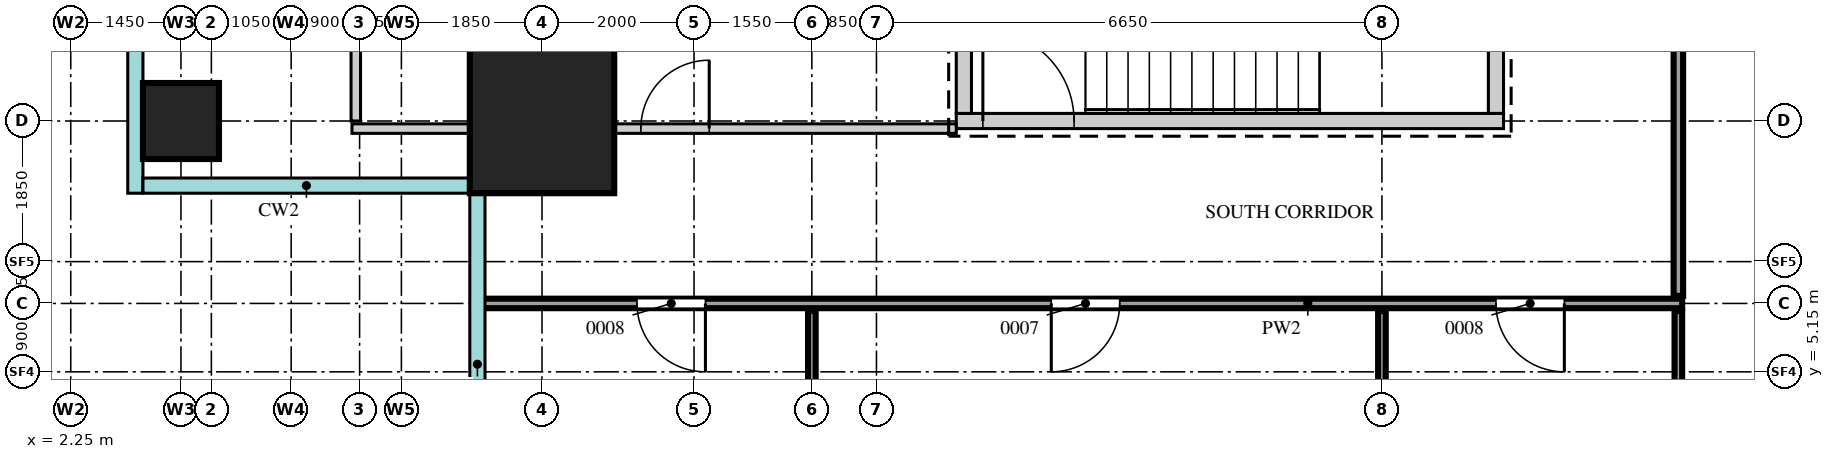
"""IFC4 building model, lengths in metres.
Left out: names, types, materials, properties, quantities, classifications, styles, units other than length and angle.
Written with IfcOpenShell. Run it as: python <this file> out.ifc"""

import sys

from ifc_helpers import new_model, si_unit, direction, frame, frame_2d, origin, origin_2d, place, context, subcontext, project, spatial, rectangle, extrude, source, transform, mapped, element, fill, save


model = new_model("IFC4")
c1 = context("Model", 3, precision=1e-05, world=origin(), true_north=direction((0.0, 1.0)))
c2 = subcontext(c1, "Body", "Model", "MODEL_VIEW")
j1 = project(units=[si_unit("LENGTHUNIT", "METRE"), si_unit("PLANEANGLEUNIT", "RADIAN")], contexts=[c1])
p1 = place(None, origin())
s1 = spatial("IfcSite", under=j1, at=p1, CompositionType="ELEMENT")
p2 = place(p1, origin())
s2 = spatial("IfcBuilding", under=s1, at=p2, CompositionType="ELEMENT")
p3 = place(p2, frame((0.0, 0.0, 172.7)))
s3 = spatial("IfcBuildingStorey", under=s2, at=p3, CompositionType="ELEMENT", Elevation=172.7)
m1 = source(origin(), c2, "Body", "SweptSolid", [
    extrude(rectangle(XDim=7.2, YDim=0.2, at=frame_2d((3.6, 0.0))), origin(), (0.0, 0.0, 1.0), 3.75),
])
p4 = place(p3, frame((13.9, 8.45, 0.0), z_axis=(0.0, 0.0, 1.0), x_axis=(1.0, 0.0, 0.0)))
e1 = element("IfcWall", 1, at=p4, inside=s3, PredefinedType="SHEAR", context=c2, shape_type="MappedRepresentation", body=[
    mapped(m1, transform((0.0, 0.0, 0.0))),
])
m2 = source(origin(), c2, "Body", "SweptSolid", [
    extrude(rectangle(XDim=1.2, YDim=2.1, at=frame_2d((0.6, 1.05))), frame((0.0, 0.11, 0.0), z_axis=(0.0, -1.0, 0.0), x_axis=(1.0, 0.0, 0.0)), (0.0, 0.0, 1.0), 0.22),
])
p5 = place(p4, frame((0.35, 0.0, 0.0)))
e2 = element("IfcOpeningElement", 2, at=p5, cuts=e1, PredefinedType="OPENING", context=c2, shape_type="MappedRepresentation", body=[
    mapped(m2, transform((0.0, 0.0, 0.0))),
])
m3 = source(origin(), c2, "Body", "SweptSolid", [
    extrude(rectangle(XDim=3.35, YDim=0.2, at=frame_2d((1.675, 0.0))), origin(), (0.0, 0.0, 1.0), 3.75),
])
for number, where, z_axis, x_axis in (
    (3, (21.0, 8.55, 0.0), (0.0, 0.0, 1.0), (0.0, 1.0, 0.0)),
    (4, (14.0, 8.55, 0.0), (0.0, 0.0, 1.0), (0.0, 1.0, 0.0)),
):
    element("IfcWall", number, at=place(p3, frame(where, z_axis=z_axis, x_axis=x_axis)), inside=s3, PredefinedType="SHEAR", context=c2, shape_type="MappedRepresentation", body=[
        mapped(m3, transform((0.0, 0.0, 0.0))),
    ])
m4 = source(origin(), c2, "Body", "SweptSolid", [
    extrude(rectangle(XDim=1.9, YDim=1.9, at=origin_2d()), origin(), (0.0, 0.0, 1.0), 4.0),
])
p6 = place(p3, frame((8.45, 8.45, 0.0), z_axis=(0.0, 0.0, 1.0), x_axis=(1.0, 0.0, 0.0)))
e5 = element("IfcColumn", 5, at=p6, inside=s3, PredefinedType="COLUMN", context=c2, shape_type="MappedRepresentation", body=[
    mapped(m4, transform((0.0, 0.0, 0.0))),
])
m5 = source(origin(), c2, "Body", "SweptSolid", [
    extrude(rectangle(XDim=1.0, YDim=1.0, at=origin_2d()), origin(), (0.0, 0.0, 1.0), 3.75),
])
p7 = place(p3, frame((3.7, 8.45, 0.0), z_axis=(0.0, 0.0, 1.0), x_axis=(1.0, 0.0, 0.0)))
e6 = element("IfcColumn", 6, at=p7, inside=s3, PredefinedType="COLUMN", context=c2, shape_type="MappedRepresentation", body=[
    mapped(m5, transform((0.0, 0.0, 0.0))),
])
m6 = source(origin(), c2, "Body", "SweptSolid", [
    extrude(rectangle(XDim=2.8, YDim=0.1, at=frame_2d((1.4, 0.0))), origin(), (0.0, 0.0, 1.0), 3.25),
])
p8 = place(p3, frame((12.0, 3.15, 0.0), z_axis=(0.0, 0.0, 1.0), x_axis=(0.0, 1.0, 0.0)))
e7 = element("IfcWall", 7, at=p8, inside=s3, PredefinedType="PARTITIONING", context=c2, shape_type="MappedRepresentation", body=[
    mapped(m6, transform((0.0, 0.0, 0.0))),
])
m7 = source(origin(), c2, "Body", "SweptSolid", [
    extrude(rectangle(XDim=2.8, YDim=0.1, at=frame_2d((1.4, 0.0))), origin(), (0.0, 0.0, 1.0), 3.42),
])
p9 = place(p3, frame((19.5, 3.15, 0.0), z_axis=(0.0, 0.0, 1.0), x_axis=(0.0, 1.0, 0.0)))
e8 = element("IfcWall", 8, at=p9, inside=s3, PredefinedType="PARTITIONING", context=c2, shape_type="MappedRepresentation", body=[
    mapped(m7, transform((0.0, 0.0, 0.0))),
])
m8 = source(origin(), c2, "Body", "SweptSolid", [
    extrude(rectangle(XDim=2.8, YDim=0.1, at=frame_2d((1.4, 0.0))), origin(), (0.0, 0.0, 1.0), 3.8),
])
p10 = place(p3, frame((23.4, 3.15, 0.0), z_axis=(0.0, 0.0, 1.0), x_axis=(0.0, 1.0, 0.0)))
e9 = element("IfcWall", 9, at=p10, inside=s3, PredefinedType="PARTITIONING", context=c2, shape_type="MappedRepresentation", body=[
    mapped(m8, transform((0.0, 0.0, 0.0))),
])
m9 = source(origin(), c2, "Body", "SweptSolid", [
    extrude(rectangle(XDim=15.8, YDim=0.125, at=frame_2d((7.9, 0.0))), origin(), (0.0, 0.0, 1.0), 3.8),
])
p11 = place(p3, frame((7.65, 6.05, 0.0), z_axis=(0.0, 0.0, 1.0), x_axis=(1.0, 0.0, 0.0)))
e10 = element("IfcWall", 10, at=p11, inside=s3, PredefinedType="PARTITIONING", context=c2, shape_type="MappedRepresentation", body=[
    mapped(m9, transform((0.0, 0.0, 0.0))),
])
m10 = source(origin(), c2, "Body", "SweptSolid", [
    extrude(rectangle(XDim=0.9, YDim=2.1, at=frame_2d((0.45, 1.05))), frame((0.0, 0.073, 0.0), z_axis=(0.0, -1.0, 0.0), x_axis=(1.0, 0.0, 0.0)), (0.0, 0.0, 1.0), 0.145),
])
p12 = place(p11, frame((2.05, 0.0, 0.0)))
e11 = element("IfcOpeningElement", 11, at=p12, cuts=e10, PredefinedType="OPENING", context=c2, shape_type="MappedRepresentation", body=[
    mapped(m10, transform((0.0, 0.0, 0.0))),
])
p13 = place(p11, frame((7.5, 0.0, 0.0)))
e12 = element("IfcOpeningElement", 12, at=p13, cuts=e10, PredefinedType="OPENING", context=c2, shape_type="MappedRepresentation", body=[
    mapped(m10, transform((0.0, 0.0, 0.0))),
])
p14 = place(p11, frame((13.35, 0.0, 0.0)))
e13 = element("IfcOpeningElement", 13, at=p14, cuts=e10, PredefinedType="OPENING", context=c2, shape_type="MappedRepresentation", body=[
    mapped(m10, transform((0.0, 0.0, 0.0))),
])
m11 = source(origin(), c2, "Body", "SweptSolid", [
    extrude(rectangle(XDim=14.75, YDim=0.125, at=frame_2d((7.375, 0.0))), origin(), (0.0, 0.0, 1.0), 3.8),
])
p15 = place(p3, frame((23.4, 6.15, 0.0), z_axis=(0.0, 0.0, 1.0), x_axis=(0.0, 1.0, 0.0)))
e14 = element("IfcWall", 14, at=p15, inside=s3, PredefinedType="PARTITIONING", context=c2, shape_type="MappedRepresentation", body=[
    mapped(m11, transform((0.0, 0.0, 0.0))),
])
p16 = place(p15, frame((7.95, 0.0, 0.0)))
e15 = element("IfcOpeningElement", 15, at=p16, cuts=e14, PredefinedType="OPENING", context=c2, shape_type="MappedRepresentation", body=[
    mapped(m10, transform((0.0, 0.0, 0.0))),
])
m12 = source(origin(), c2, "Body", "SweptSolid", [
    extrude(rectangle(XDim=7.95, YDim=0.125, at=frame_2d((3.975, 0.0))), origin(), (0.0, 0.0, 1.0), 3.25),
])
p17 = place(p3, frame((5.95, 8.35, 0.0), z_axis=(0.0, 0.0, 1.0), x_axis=(1.0, 0.0, 0.0)))
e16 = element("IfcWall", 16, at=p17, inside=s3, PredefinedType="PARTITIONING", context=c2, shape_type="MappedRepresentation", body=[
    mapped(m12, transform((0.0, 0.0, 0.0))),
])
p18 = place(p17, frame((3.8, 0.0, 0.0)))
e17 = element("IfcOpeningElement", 17, at=p18, cuts=e16, PredefinedType="OPENING", context=c2, shape_type="MappedRepresentation", body=[
    mapped(m10, transform((0.0, 0.0, 0.0))),
])
m13 = source(origin(), c2, "Body", "SweptSolid", [
    extrude(rectangle(XDim=4.05, YDim=0.125, at=frame_2d((2.025, 0.0))), origin(), (0.0, 0.0, 1.0), 3.8),
])
p19 = place(p3, frame((6.0, 8.45, 0.0), z_axis=(0.0, 0.0, 1.0), x_axis=(0.0, 1.0, 0.0)))
e18 = element("IfcWall", 18, at=p19, inside=s3, PredefinedType="PARTITIONING", context=c2, shape_type="MappedRepresentation", body=[
    mapped(m13, transform((0.0, 0.0, 0.0))),
])
m14 = source(origin(), c2, "Body", "SweptSolid", [
    extrude(rectangle(XDim=0.9, YDim=2.1, at=frame_2d((0.45, 1.05))), frame((0.0, 0.025, 0.0), z_axis=(0.0, -1.0, 0.0), x_axis=(1.0, 0.0, 0.0)), (0.0, 0.0, 1.0), 0.05),
])
p20 = place(p18, origin())
e19 = element("IfcDoor", 19, at=p20, inside=s3, OperationType="SINGLE_SWING_LEFT", PredefinedType="DOOR", context=c2, shape_type="MappedRepresentation", body=[
    mapped(m14, transform((0.0, 0.0, 0.0))),
])
fill(e17, e19)
p21 = place(p12, origin())
e20 = element("IfcDoor", 20, at=p21, inside=s3, OperationType="SINGLE_SWING_RIGHT", PredefinedType="DOOR", context=c2, shape_type="MappedRepresentation", body=[
    mapped(m14, transform((0.0, 0.0, 0.0))),
])
fill(e11, e20)
p22 = place(p13, origin())
e21 = element("IfcDoor", 21, at=p22, inside=s3, OperationType="SINGLE_SWING_LEFT", PredefinedType="DOOR", context=c2, shape_type="MappedRepresentation", body=[
    mapped(m14, transform((0.0, 0.0, 0.0))),
])
fill(e12, e21)
p23 = place(p14, origin())
e22 = element("IfcDoor", 22, at=p23, inside=s3, OperationType="SINGLE_SWING_RIGHT", PredefinedType="DOOR", context=c2, shape_type="MappedRepresentation", body=[
    mapped(m14, transform((0.0, 0.0, 0.0))),
])
fill(e13, e22)
m15 = source(origin(), c2, "Body", "SweptSolid", [
    extrude(rectangle(XDim=1.2, YDim=2.1, at=frame_2d((0.6, 1.05))), frame((0.0, 0.025, 0.0), z_axis=(0.0, -1.0, 0.0), x_axis=(1.0, 0.0, 0.0)), (0.0, 0.0, 1.0), 0.05),
])
p24 = place(p5, origin())
e23 = element("IfcDoor", 23, at=p24, inside=s3, OperationType="SINGLE_SWING_RIGHT", PredefinedType="DOOR", context=c2, shape_type="MappedRepresentation", body=[
    mapped(m15, transform((0.0, 0.0, 0.0))),
])
fill(e2, e23)
save(model, sys.argv[1])
